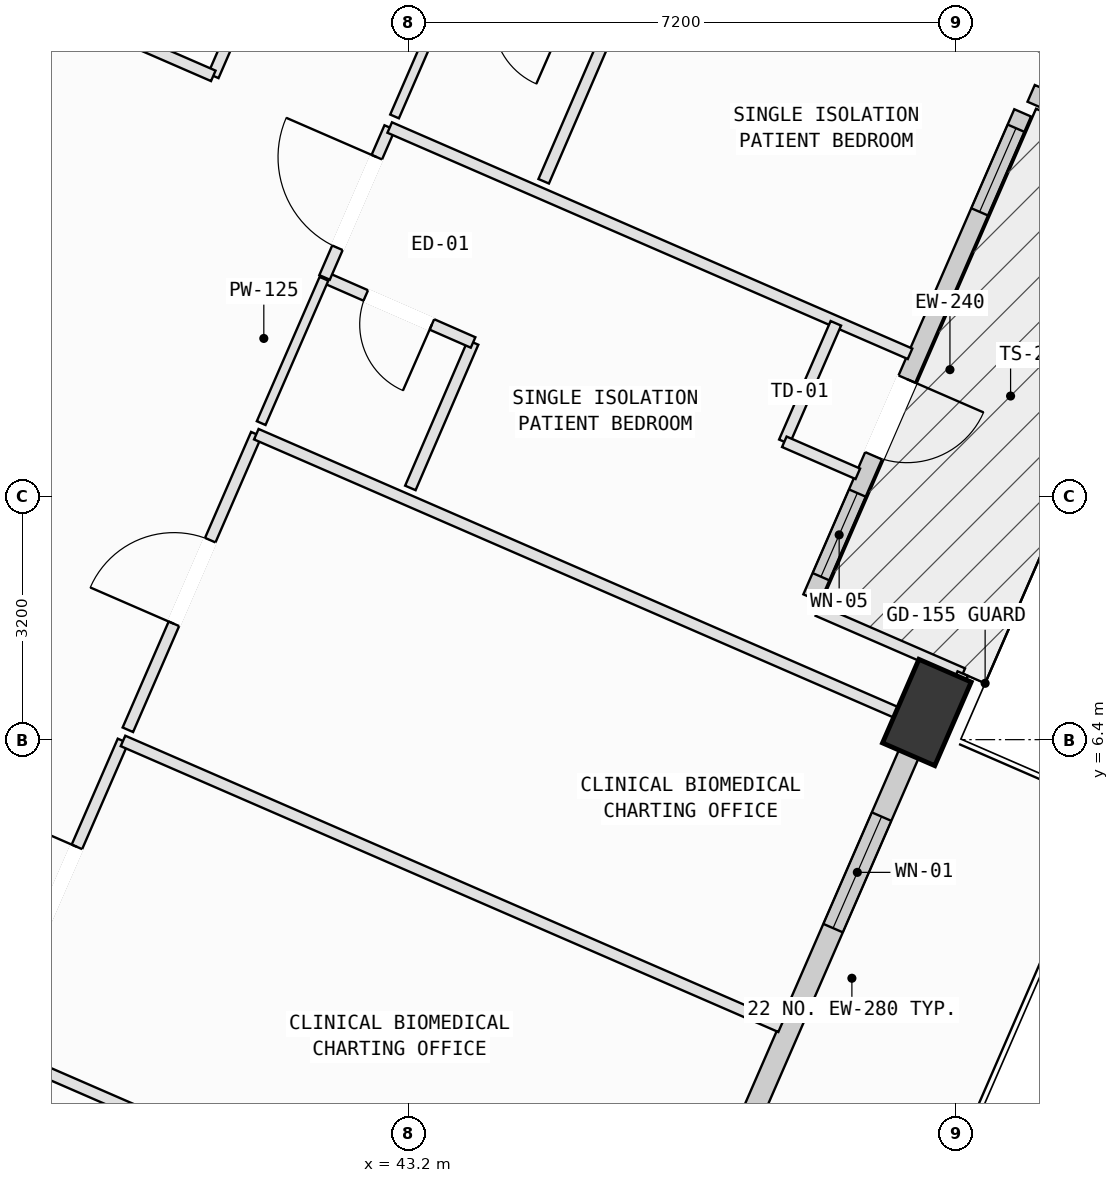
"""IFC4 building model, lengths in metres.
Left out: names, types, materials, properties, quantities, classifications, styles, units other than length and angle.
Written with IfcOpenShell. Run it as: python <this file> out.ifc"""

import sys

from ifc_helpers import new_model, si_unit, direction, frame, frame_2d, origin, origin_2d, place, context, subcontext, project, spatial, rectangle, extrude, element, fill, save


model = new_model("IFC4")
c1 = context("Model", 3, precision=1e-05, world=origin(), true_north=direction((0.0, 1.0)))
c2 = subcontext(c1, "Body", "Model", "MODEL_VIEW")
j1 = project(units=[si_unit("LENGTHUNIT", "METRE"), si_unit("PLANEANGLEUNIT", "RADIAN")], contexts=[c1])
p1 = place(None, origin())
s1 = spatial("IfcSite", under=j1, at=p1, CompositionType="ELEMENT")
p2 = place(p1, origin())
s2 = spatial("IfcBuilding", under=s1, at=p2, CompositionType="ELEMENT")
p3 = place(p2, frame((0.0, 0.0, 324.6)))
s3 = spatial("IfcBuildingStorey", under=s2, at=p3, CompositionType="ELEMENT", Elevation=324.6)
p4 = place(p3, frame((50.017, 6.757, 0.002), z_axis=(0.0, 0.0, 1.0), x_axis=(0.398749068925, 0.917060074385, 0.0)))
e1 = element("IfcColumn", 1, at=p4, inside=s3, PredefinedType="COLUMN", context=c2, shape_type="SweptSolid", body=[
    extrude(rectangle(XDim=1.2, YDim=0.75, at=origin_2d()), origin(), (0.0, 0.0, 1.0), 3.996),
])
p5 = place(p3, frame((51.278, 14.647, 0.0), z_axis=(0.0, 0.0, 1.0), x_axis=(-0.398727394062, -0.917069498579, 0.0)))
e2 = element("IfcWall", 2, at=p5, inside=s3, PredefinedType="SOLIDWALL", context=c2, shape_type="SweptSolid", body=[
    extrude(rectangle(XDim=6.96, YDim=0.24, at=frame_2d((3.48, 0.0))), origin(), (0.0, 0.0, 1.0), 3.265),
])
p6 = place(p5, frame((3.82, 0.0, 0.0)))
e3 = element("IfcOpeningElement", 3, at=p6, cuts=e2, PredefinedType="OPENING", context=c2, shape_type="SweptSolid", body=[
    extrude(rectangle(XDim=1.1, YDim=2.15, at=frame_2d((0.55, 1.075))), frame((0.0, 0.13, 0.0), z_axis=(0.0, -1.0, 0.0), x_axis=(1.0, 0.0, 0.0)), (0.0, 0.0, 1.0), 0.26),
])
p7 = place(p5, frame((5.455, 0.0, 0.75)))
e4 = element("IfcOpeningElement", 4, at=p7, cuts=e2, PredefinedType="OPENING", context=c2, shape_type="SweptSolid", body=[
    extrude(rectangle(XDim=1.2, YDim=1.75, at=frame_2d((0.6, 0.875))), frame((0.0, 0.13, 0.0), z_axis=(0.0, -1.0, 0.0), x_axis=(1.0, 0.0, 0.0)), (0.0, 0.0, 1.0), 0.26),
])
p8 = place(p5, frame((0.22, 0.0, 0.75)))
e5 = element("IfcOpeningElement", 5, at=p8, cuts=e2, PredefinedType="OPENING", context=c2, shape_type="SweptSolid", body=[
    extrude(rectangle(XDim=1.2, YDim=1.75, at=frame_2d((0.6, 0.875))), frame((0.0, 0.13, 0.0), z_axis=(0.0, -1.0, 0.0), x_axis=(1.0, 0.0, 0.0)), (0.0, 0.0, 1.0), 0.26),
])
p9 = place(p3, frame((53.682, 13.907, 0.0), z_axis=(0.0, 0.0, 1.0), x_axis=(-0.917056081644, 0.398758251475, 0.0)))
e6 = element("IfcWall", 6, at=p9, inside=s3, PredefinedType="SOLIDWALL", context=c2, shape_type="SweptSolid", body=[
    extrude(rectangle(XDim=2.5, YDim=0.24, at=frame_2d((1.25, 0.0))), origin(), (0.0, 0.0, 1.0), 3.265),
])
p10 = place(p3, frame((49.859, 6.393, 0.0), z_axis=(0.0, 0.0, 1.0), x_axis=(-0.398758169539, -0.917056117272, 0.0)))
e7 = element("IfcWall", 7, at=p10, inside=s3, PredefinedType="SOLIDWALL", context=c2, shape_type="SweptSolid", body=[
    extrude(rectangle(XDim=6.405, YDim=0.28, at=frame_2d((3.202, 0.0))), origin(), (0.0, 0.0, 1.0), 3.265),
])
p11 = place(p10, frame((1.096, 0.0, 0.75)))
e8 = element("IfcOpeningElement", 8, at=p11, cuts=e7, PredefinedType="OPENING", context=c2, shape_type="SweptSolid", body=[
    extrude(rectangle(XDim=1.6, YDim=1.95, at=frame_2d((0.8, 0.975))), frame((0.0, 0.15, 0.0), z_axis=(0.0, -1.0, 0.0), x_axis=(1.0, 0.0, 0.0)), (0.0, 0.0, 1.0), 0.3),
])
p12 = place(p3, frame((37.686, 2.348, 0.0), z_axis=(0.0, 0.0, 1.0), x_axis=(0.917079517358, -0.398704350167, 0.0)))
e9 = element("IfcWall", 9, at=p12, inside=s3, PredefinedType="PARTITIONING", context=c2, shape_type="SweptSolid", body=[
    extrude(rectangle(XDim=9.436, YDim=0.15, at=frame_2d((4.718, 0.0))), origin(), (0.0, 0.0, 1.0), 3.78),
])
p13 = place(p3, frame((37.75, 2.495, 0.0), z_axis=(0.0, 0.0, 1.0), x_axis=(0.398827178626, 0.917026107365, 0.0)))
e10 = element("IfcWall", 10, at=p13, inside=s3, PredefinedType="PARTITIONING", context=c2, shape_type="SweptSolid", body=[
    extrude(rectangle(XDim=4.24, YDim=0.15, at=frame_2d((2.12, 0.0))), origin(), (0.0, 0.0, 1.0), 3.78),
])
p14 = place(p13, frame((1.52, 0.0, 0.0)))
e11 = element("IfcOpeningElement", 11, at=p14, cuts=e10, PredefinedType="OPENING", context=c2, shape_type="SweptSolid", body=[
    extrude(rectangle(XDim=1.2, YDim=2.15, at=frame_2d((0.6, 1.075))), frame((0.0, 0.085, 0.0), z_axis=(0.0, -1.0, 0.0), x_axis=(1.0, 0.0, 0.0)), (0.0, 0.0, 1.0), 0.17),
])
p15 = place(p3, frame((39.441, 6.383, 0.0), z_axis=(0.0, 0.0, 1.0), x_axis=(0.91710090998, -0.398655140333, 0.0)))
e12 = element("IfcWall", 12, at=p15, inside=s3, PredefinedType="PARTITIONING", context=c2, shape_type="SweptSolid", body=[
    extrude(rectangle(XDim=9.434, YDim=0.15, at=frame_2d((4.717, 0.0))), origin(), (0.0, 0.0, 1.0), 3.78),
])
p16 = place(p3, frame((39.505, 6.53, 0.0), z_axis=(0.0, 0.0, 1.0), x_axis=(0.398597683129, 0.917125883946, 0.0)))
e13 = element("IfcWall", 13, at=p16, inside=s3, PredefinedType="PARTITIONING", context=c2, shape_type="SweptSolid", body=[
    extrude(rectangle(XDim=4.24, YDim=0.15, at=frame_2d((2.12, 0.0))), origin(), (0.0, 0.0, 1.0), 3.78),
])
p17 = place(p16, frame((1.52, 0.0, 0.0)))
e14 = element("IfcOpeningElement", 14, at=p17, cuts=e13, PredefinedType="OPENING", context=c2, shape_type="SweptSolid", body=[
    extrude(rectangle(XDim=1.2, YDim=2.15, at=frame_2d((0.6, 1.075))), frame((0.0, 0.085, 0.0), z_axis=(0.0, -1.0, 0.0), x_axis=(1.0, 0.0, 0.0)), (0.0, 0.0, 1.0), 0.17),
])
p18 = place(p3, frame((41.195, 10.419, 0.0), z_axis=(0.0, 0.0, 1.0), x_axis=(0.917057356127, -0.398755320434, 0.0)))
e15 = element("IfcWall", 15, at=p18, inside=s3, PredefinedType="PARTITIONING", context=c2, shape_type="SweptSolid", body=[
    extrude(rectangle(XDim=9.78, YDim=0.15, at=frame_2d((4.89, 0.0))), origin(), (0.0, 0.0, 1.0), 2.765),
])
p19 = place(p3, frame((43.222, 9.712, 0.0), z_axis=(0.0, 0.0, 1.0), x_axis=(0.395897468888, 0.918294720734, 0.0)))
e16 = element("IfcWall", 16, at=p19, inside=s3, PredefinedType="PARTITIONING", context=c2, shape_type="SweptSolid", body=[
    extrude(rectangle(XDim=2.084, YDim=0.15, at=frame_2d((1.042, 0.0))), origin(), (0.0, 0.0, 1.0), 3.415),
])
p20 = place(p3, frame((44.047, 11.626, 0.0), z_axis=(0.0, 0.0, 1.0), x_axis=(-0.915978642335, 0.40122702649, 0.0)))
e17 = element("IfcWall", 17, at=p20, inside=s3, PredefinedType="PARTITIONING", context=c2, shape_type="SweptSolid", body=[
    extrude(rectangle(XDim=2.133, YDim=0.15, at=frame_2d((1.067, 0.0))), origin(), (0.0, 0.0, 1.0), 3.78),
])
p21 = place(p20, frame((0.592, 0.0, 0.0)))
e18 = element("IfcOpeningElement", 18, at=p21, cuts=e17, PredefinedType="OPENING", context=c2, shape_type="SweptSolid", body=[
    extrude(rectangle(XDim=0.95, YDim=2.1, at=frame_2d((0.475, 1.05))), frame((0.0, 0.085, 0.0), z_axis=(0.0, -1.0, 0.0), x_axis=(1.0, 0.0, 0.0)), (0.0, 0.0, 1.0), 0.17),
])
p22 = place(p3, frame((42.093, 12.482, 0.0), z_axis=(0.0, 0.0, 1.0), x_axis=(0.398518519728, 0.917160285574, 0.0)))
e19 = element("IfcWall", 19, at=p22, inside=s3, PredefinedType="PARTITIONING", context=c2, shape_type="SweptSolid", body=[
    extrude(rectangle(XDim=2.15, YDim=0.15, at=frame_2d((1.075, 0.0))), origin(), (0.0, 0.0, 1.0), 3.78),
])
p23 = place(p22, frame((0.425, 0.0, 0.0)))
e20 = element("IfcOpeningElement", 20, at=p23, cuts=e19, PredefinedType="OPENING", context=c2, shape_type="SweptSolid", body=[
    extrude(rectangle(XDim=1.3, YDim=2.15, at=frame_2d((0.65, 1.075))), frame((0.0, 0.085, 0.0), z_axis=(0.0, -1.0, 0.0), x_axis=(1.0, 0.0, 0.0)), (0.0, 0.0, 1.0), 0.17),
])
p24 = place(p3, frame((42.95, 14.454, 0.0), z_axis=(0.0, 0.0, 1.0), x_axis=(0.917043017742, -0.398788294224, 0.0)))
e21 = element("IfcWall", 21, at=p24, inside=s3, PredefinedType="PARTITIONING", context=c2, shape_type="SweptSolid", body=[
    extrude(rectangle(XDim=7.465, YDim=0.15, at=frame_2d((3.733, 0.0))), origin(), (0.0, 0.0, 1.0), 3.78),
])
p25 = place(p3, frame((48.82, 11.878, 0.0), z_axis=(0.0, 0.0, 1.0), x_axis=(-0.398836393262, -0.917022099739, 0.0)))
e22 = element("IfcWall", 22, at=p25, inside=s3, PredefinedType="PARTITIONING", context=c2, shape_type="SweptSolid", body=[
    extrude(rectangle(XDim=1.7, YDim=0.15, at=frame_2d((0.85, 0.0))), origin(), (0.0, 0.0, 1.0), 3.78),
])
p26 = place(p3, frame((48.142, 10.319, 0.0), z_axis=(0.0, 0.0, 1.0), x_axis=(0.916793786887, -0.399360929894, 0.0)))
e23 = element("IfcWall", 23, at=p26, inside=s3, PredefinedType="PARTITIONING", context=c2, shape_type="SweptSolid", body=[
    extrude(rectangle(XDim=1.054, YDim=0.15, at=frame_2d((0.527, 0.0))), origin(), (0.0, 0.0, 1.0), 3.78),
])
p27 = place(p3, frame((48.583, 8.098, 0.0), z_axis=(0.0, 0.0, 1.0), x_axis=(0.917116716698, -0.398618775213, 0.0)))
e24 = element("IfcWall", 24, at=p27, inside=s3, PredefinedType="PARTITIONING", context=c2, shape_type="SweptSolid", body=[
    extrude(rectangle(XDim=2.079, YDim=0.15, at=frame_2d((1.04, 0.0))), origin(), (0.0, 0.0, 1.0), 3.78),
])
p28 = place(p3, frame((50.49, 7.269, 0.0), z_axis=(0.0, 0.0, 1.0), x_axis=(-0.398440950443, -0.917193986575, 0.0)))
e25 = element("IfcWall", 25, at=p28, inside=s3, PredefinedType="PARTITIONING", context=c2, shape_type="SweptSolid", body=[
    extrude(rectangle(XDim=0.657, YDim=0.15, at=frame_2d((0.329, 0.0))), origin(), (0.0, 0.0, 1.0), 3.265),
])
p29 = place(p3, frame((41.259, 10.565, 0.0), z_axis=(0.0, 0.0, 1.0), x_axis=(0.398808011477, 0.917034443182, 0.0)))
e26 = element("IfcWall", 26, at=p29, inside=s3, PredefinedType="PARTITIONING", context=c2, shape_type="SweptSolid", body=[
    extrude(rectangle(XDim=2.071, YDim=0.125, at=frame_2d((1.036, 0.0))), origin(), (0.0, 0.0, 1.0), 3.78),
])
p30 = place(p3, frame((44.976, 13.747, 0.0), z_axis=(0.0, 0.0, 1.0), x_axis=(0.396236327193, 0.918148557159, 0.0)))
e27 = element("IfcWall", 27, at=p30, inside=s3, PredefinedType="PARTITIONING", context=c2, shape_type="SweptSolid", body=[
    extrude(rectangle(XDim=2.084, YDim=0.15, at=frame_2d((1.042, 0.0))), origin(), (0.0, 0.0, 1.0), 3.78),
])
p31 = place(p3, frame((44.704, 18.489, 0.0), z_axis=(0.0, 0.0, 1.0), x_axis=(0.917075404025, -0.398713811315, 0.0)))
e28 = element("IfcWall", 28, at=p31, inside=s3, PredefinedType="PARTITIONING", context=c2, shape_type="SweptSolid", body=[
    extrude(rectangle(XDim=9.435, YDim=0.15, at=frame_2d((4.718, 0.0))), origin(), (0.0, 0.0, 1.0), 3.78),
])
p32 = place(p3, frame((43.014, 14.6, 0.0), z_axis=(0.0, 0.0, 1.0), x_axis=(0.398553636867, 0.917145025904, 0.0)))
e29 = element("IfcWall", 29, at=p32, inside=s3, PredefinedType="PARTITIONING", context=c2, shape_type="SweptSolid", body=[
    extrude(rectangle(XDim=2.071, YDim=0.125, at=frame_2d((1.035, 0.0))), origin(), (0.0, 0.0, 1.0), 3.78),
])
p33 = place(p3, frame((42.91, 20.381, 0.0), z_axis=(0.0, 0.0, 1.0), x_axis=(-0.398677741034, -0.917091085337, 0.0)))
e30 = element("IfcWall", 30, at=p33, inside=s3, PredefinedType="PARTITIONING", context=c2, shape_type="SweptSolid", body=[
    extrude(rectangle(XDim=5.721, YDim=0.15, at=frame_2d((2.861, 0.0))), origin(), (0.0, 0.0, 1.0), 3.78),
])
p34 = place(p3, frame((40.629, 15.134, 0.0), z_axis=(0.0, 0.0, 1.0), x_axis=(-0.916933705125, 0.399039572481, 0.0)))
e31 = element("IfcWall", 31, at=p34, inside=s3, PredefinedType="PARTITIONING", context=c2, shape_type="SweptSolid", body=[
    extrude(rectangle(XDim=1.253, YDim=0.15, at=frame_2d((0.626, 0.0))), origin(), (0.0, 0.0, 1.0), 3.78),
])
p35 = place(p6, origin())
e32 = element("IfcDoor", 32, at=p35, inside=s3, OperationType="SINGLE_SWING_LEFT", PredefinedType="DOOR", context=c2, shape_type="SweptSolid", body=[
    extrude(rectangle(XDim=1.1, YDim=2.15, at=frame_2d((0.55, 1.075))), frame((0.0, 0.025, 0.0), z_axis=(0.0, -1.0, 0.0), x_axis=(1.0, 0.0, 0.0)), (0.0, 0.0, 1.0), 0.05),
])
fill(e3, e32)
p36 = place(p7, origin())
e33 = element("IfcWindow", 33, at=p36, inside=s3, PartitioningType="SINGLE_PANEL", PredefinedType="WINDOW", context=c2, shape_type="SweptSolid", body=[
    extrude(rectangle(XDim=1.2, YDim=1.75, at=frame_2d((0.6, 0.875))), frame((0.0, 0.03, 0.0), z_axis=(0.0, -1.0, 0.0), x_axis=(1.0, 0.0, 0.0)), (0.0, 0.0, 1.0), 0.06),
])
fill(e4, e33)
p37 = place(p8, origin())
e34 = element("IfcWindow", 34, at=p37, inside=s3, PartitioningType="SINGLE_PANEL", PredefinedType="WINDOW", context=c2, shape_type="SweptSolid", body=[
    extrude(rectangle(XDim=1.2, YDim=1.75, at=frame_2d((0.6, 0.875))), frame((0.0, 0.03, 0.0), z_axis=(0.0, -1.0, 0.0), x_axis=(1.0, 0.0, 0.0)), (0.0, 0.0, 1.0), 0.06),
])
fill(e5, e34)
p38 = place(p11, origin())
e35 = element("IfcWindow", 35, at=p38, inside=s3, PartitioningType="SINGLE_PANEL", PredefinedType="WINDOW", context=c2, shape_type="SweptSolid", body=[
    extrude(rectangle(XDim=1.6, YDim=1.95, at=frame_2d((0.8, 0.975))), frame((0.0, 0.03, 0.0), z_axis=(0.0, -1.0, 0.0), x_axis=(1.0, 0.0, 0.0)), (0.0, 0.0, 1.0), 0.06),
])
fill(e8, e35)
p39 = place(p14, origin())
e36 = element("IfcDoor", 36, at=p39, inside=s3, OperationType="SINGLE_SWING_RIGHT", PredefinedType="DOOR", context=c2, shape_type="SweptSolid", body=[
    extrude(rectangle(XDim=1.2, YDim=2.15, at=frame_2d((0.6, 1.075))), frame((0.0, 0.025, 0.0), z_axis=(0.0, -1.0, 0.0), x_axis=(1.0, 0.0, 0.0)), (0.0, 0.0, 1.0), 0.05),
])
fill(e11, e36)
p40 = place(p17, origin())
e37 = element("IfcDoor", 37, at=p40, inside=s3, OperationType="SINGLE_SWING_LEFT", PredefinedType="DOOR", context=c2, shape_type="SweptSolid", body=[
    extrude(rectangle(XDim=1.2, YDim=2.15, at=frame_2d((0.6, 1.075))), frame((0.0, 0.025, 0.0), z_axis=(0.0, -1.0, 0.0), x_axis=(1.0, 0.0, 0.0)), (0.0, 0.0, 1.0), 0.05),
])
fill(e14, e37)
p41 = place(p23, origin())
e38 = element("IfcDoor", 38, at=p41, inside=s3, OperationType="SINGLE_SWING_RIGHT", PredefinedType="DOOR", context=c2, shape_type="SweptSolid", body=[
    extrude(rectangle(XDim=1.3, YDim=2.15, at=frame_2d((0.65, 1.075))), frame((0.0, 0.025, 0.0), z_axis=(0.0, -1.0, 0.0), x_axis=(1.0, 0.0, 0.0)), (0.0, 0.0, 1.0), 0.05),
])
fill(e20, e38)
p42 = place(p21, origin())
e39 = element("IfcDoor", 39, at=p42, inside=s3, OperationType="SINGLE_SWING_LEFT", PredefinedType="DOOR", context=c2, shape_type="SweptSolid", body=[
    extrude(rectangle(XDim=0.95, YDim=2.1, at=frame_2d((0.475, 1.05))), frame((0.0, 0.025, 0.0), z_axis=(0.0, -1.0, 0.0), x_axis=(1.0, 0.0, 0.0)), (0.0, 0.0, 1.0), 0.05),
])
fill(e18, e39)
save(model, sys.argv[1])
